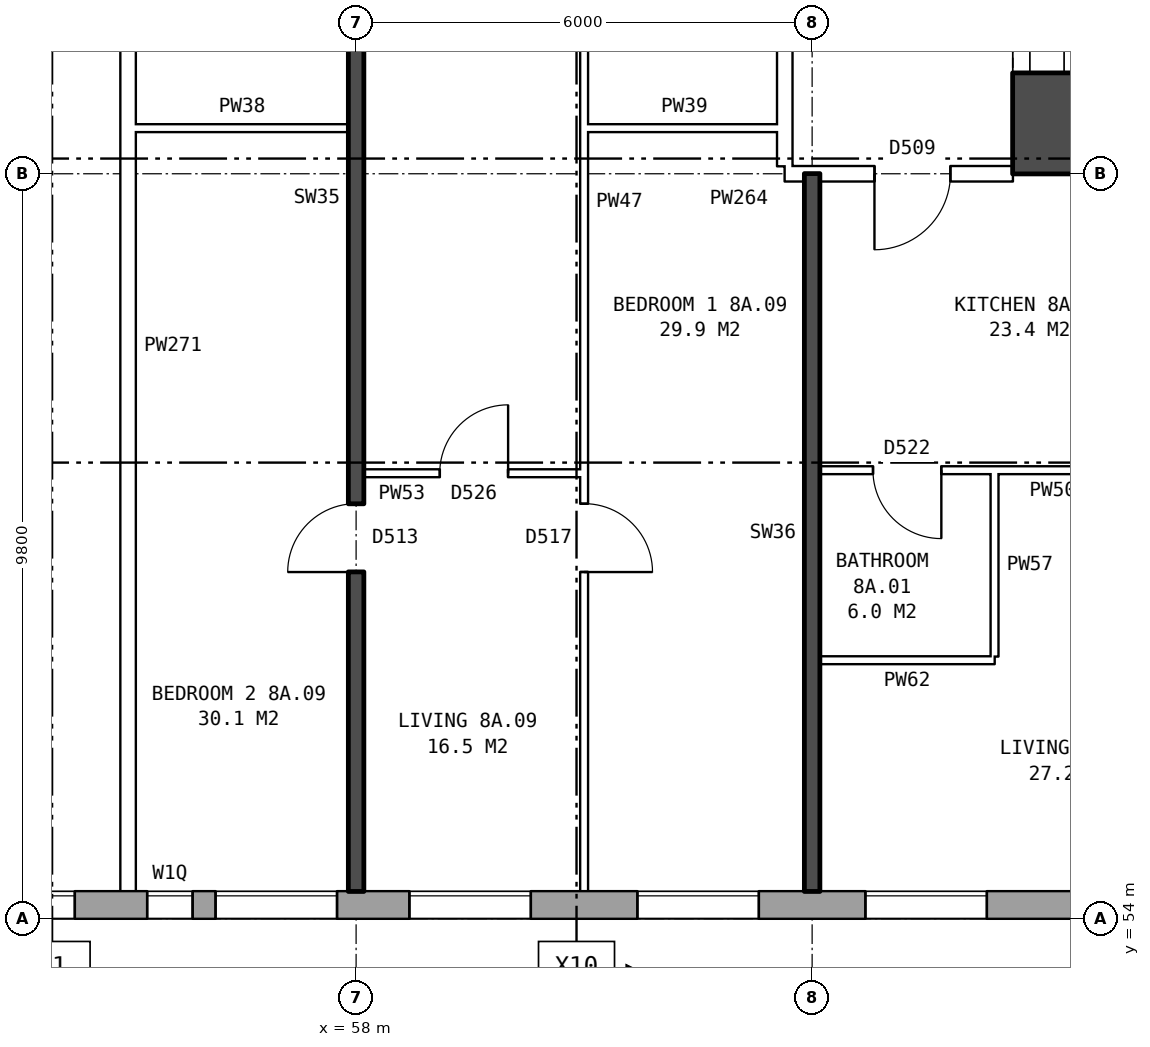
"""IFC4 building model, lengths in metres.
Left out: names, types, materials, properties, quantities, classifications, styles, units other than length and angle.
Written with IfcOpenShell. Run it as: python <this file> out.ifc"""

import sys

from ifc_helpers import new_model, si_unit, direction, frame, frame_2d, origin, place, context, subcontext, project, spatial, rectangle, extrude, element, fill, save


model = new_model("IFC4")
c1 = context("Model", 3, precision=1e-05, world=origin(), true_north=direction((0.0, 1.0)))
c2 = subcontext(c1, "Body", "Model", "MODEL_VIEW")
j1 = project(units=[si_unit("LENGTHUNIT", "METRE"), si_unit("PLANEANGLEUNIT", "RADIAN")], contexts=[c1])
p1 = place(None, origin())
s1 = spatial("IfcSite", under=j1, at=p1, CompositionType="ELEMENT")
p2 = place(p1, origin())
s2 = spatial("IfcBuilding", under=s1, at=p2, CompositionType="ELEMENT")
p3 = place(p2, frame((0.0, 0.0, 31.9)))
s3 = spatial("IfcBuildingStorey", under=s2, at=p3, CompositionType="ELEMENT", Elevation=31.9)
p4 = place(p3, frame((22.825, 54.18, 0.0), z_axis=(0.0, 0.0, 1.0), x_axis=(1.0, 0.0, 0.0)))
e1 = element("IfcWall", 1, at=p4, inside=s3, PredefinedType="STANDARD", context=c2, shape_type="SweptSolid", body=[
    extrude(rectangle(XDim=50.101, YDim=0.36, at=frame_2d((25.05, 0.0))), origin(), (0.0, 0.0, 1.0), 2.85),
])
p5 = place(p4, frame((2.875, 0.0, 0.8)))
e2 = element("IfcOpeningElement", 2, at=p5, cuts=e1, PredefinedType="OPENING", context=c2, shape_type="SweptSolid", body=[
    extrude(rectangle(XDim=1.6, YDim=1.8, at=frame_2d((0.8, 0.9))), frame((0.0, 0.19, 0.0), z_axis=(0.0, -1.0, 0.0), x_axis=(1.0, 0.0, 0.0)), (0.0, 0.0, 1.0), 0.38),
])
p6 = place(p4, frame((5.875, 0.0, 0.8)))
e3 = element("IfcOpeningElement", 3, at=p6, cuts=e1, PredefinedType="OPENING", context=c2, shape_type="SweptSolid", body=[
    extrude(rectangle(XDim=1.6, YDim=1.8, at=frame_2d((0.8, 0.9))), frame((0.0, 0.19, 0.0), z_axis=(0.0, -1.0, 0.0), x_axis=(1.0, 0.0, 0.0)), (0.0, 0.0, 1.0), 0.38),
])
p7 = place(p4, frame((8.875, 0.0, 0.8)))
e4 = element("IfcOpeningElement", 4, at=p7, cuts=e1, PredefinedType="OPENING", context=c2, shape_type="SweptSolid", body=[
    extrude(rectangle(XDim=1.6, YDim=1.8, at=frame_2d((0.8, 0.9))), frame((0.0, 0.19, 0.0), z_axis=(0.0, -1.0, 0.0), x_axis=(1.0, 0.0, 0.0)), (0.0, 0.0, 1.0), 0.38),
])
p8 = place(p4, frame((11.875, 0.0, 0.8)))
e5 = element("IfcOpeningElement", 5, at=p8, cuts=e1, PredefinedType="OPENING", context=c2, shape_type="SweptSolid", body=[
    extrude(rectangle(XDim=1.6, YDim=1.8, at=frame_2d((0.8, 0.9))), frame((0.0, 0.19, 0.0), z_axis=(0.0, -1.0, 0.0), x_axis=(1.0, 0.0, 0.0)), (0.0, 0.0, 1.0), 0.38),
])
p9 = place(p4, frame((14.875, 0.0, 0.8)))
e6 = element("IfcOpeningElement", 6, at=p9, cuts=e1, PredefinedType="OPENING", context=c2, shape_type="SweptSolid", body=[
    extrude(rectangle(XDim=1.6, YDim=1.8, at=frame_2d((0.8, 0.9))), frame((0.0, 0.19, 0.0), z_axis=(0.0, -1.0, 0.0), x_axis=(1.0, 0.0, 0.0)), (0.0, 0.0, 1.0), 0.38),
])
p10 = place(p4, frame((17.375, 0.0, 1.6)))
e7 = element("IfcOpeningElement", 7, at=p10, cuts=e1, PredefinedType="OPENING", context=c2, shape_type="SweptSolid", body=[
    extrude(rectangle(XDim=0.6, YDim=0.9, at=frame_2d((0.3, 0.45))), frame((0.0, 0.19, 0.0), z_axis=(0.0, -1.0, 0.0), x_axis=(1.0, 0.0, 0.0)), (0.0, 0.0, 1.0), 0.38),
])
p11 = place(p4, frame((20.875, 0.0, 0.8)))
e8 = element("IfcOpeningElement", 8, at=p11, cuts=e1, PredefinedType="OPENING", context=c2, shape_type="SweptSolid", body=[
    extrude(rectangle(XDim=1.6, YDim=1.8, at=frame_2d((0.8, 0.9))), frame((0.0, 0.19, 0.0), z_axis=(0.0, -1.0, 0.0), x_axis=(1.0, 0.0, 0.0)), (0.0, 0.0, 1.0), 0.38),
])
p12 = place(p4, frame((23.875, 0.0, 0.8)))
e9 = element("IfcOpeningElement", 9, at=p12, cuts=e1, PredefinedType="OPENING", context=c2, shape_type="SweptSolid", body=[
    extrude(rectangle(XDim=1.6, YDim=1.8, at=frame_2d((0.8, 0.9))), frame((0.0, 0.19, 0.0), z_axis=(0.0, -1.0, 0.0), x_axis=(1.0, 0.0, 0.0)), (0.0, 0.0, 1.0), 0.38),
])
p13 = place(p4, frame((26.875, 0.0, 0.8)))
e10 = element("IfcOpeningElement", 10, at=p13, cuts=e1, PredefinedType="OPENING", context=c2, shape_type="SweptSolid", body=[
    extrude(rectangle(XDim=1.6, YDim=1.8, at=frame_2d((0.8, 0.9))), frame((0.0, 0.19, 0.0), z_axis=(0.0, -1.0, 0.0), x_axis=(1.0, 0.0, 0.0)), (0.0, 0.0, 1.0), 0.38),
])
p14 = place(p4, frame((29.375, 0.0, 0.15)))
e11 = element("IfcOpeningElement", 11, at=p14, cuts=e1, PredefinedType="OPENING", context=c2, shape_type="SweptSolid", body=[
    extrude(rectangle(XDim=0.8, YDim=1.8, at=frame_2d((0.4, 0.9))), frame((0.0, 0.19, 0.0), z_axis=(0.0, -1.0, 0.0), x_axis=(1.0, 0.0, 0.0)), (0.0, 0.0, 1.0), 0.38),
])
p15 = place(p4, frame((32.425, 0.0, 1.4)))
e12 = element("IfcOpeningElement", 12, at=p15, cuts=e1, PredefinedType="OPENING", context=c2, shape_type="SweptSolid", body=[
    extrude(rectangle(XDim=0.6, YDim=1.2, at=frame_2d((0.3, 0.6))), frame((0.0, 0.19, 0.0), z_axis=(0.0, -1.0, 0.0), x_axis=(1.0, 0.0, 0.0)), (0.0, 0.0, 1.0), 0.38),
])
p16 = place(p4, frame((35.875, 0.0, 0.8)))
e13 = element("IfcOpeningElement", 13, at=p16, cuts=e1, PredefinedType="OPENING", context=c2, shape_type="SweptSolid", body=[
    extrude(rectangle(XDim=1.6, YDim=1.8, at=frame_2d((0.8, 0.9))), frame((0.0, 0.19, 0.0), z_axis=(0.0, -1.0, 0.0), x_axis=(1.0, 0.0, 0.0)), (0.0, 0.0, 1.0), 0.38),
])
p17 = place(p4, frame((38.875, 0.0, 0.8)))
e14 = element("IfcOpeningElement", 14, at=p17, cuts=e1, PredefinedType="OPENING", context=c2, shape_type="SweptSolid", body=[
    extrude(rectangle(XDim=1.6, YDim=1.8, at=frame_2d((0.8, 0.9))), frame((0.0, 0.19, 0.0), z_axis=(0.0, -1.0, 0.0), x_axis=(1.0, 0.0, 0.0)), (0.0, 0.0, 1.0), 0.38),
])
p18 = place(p4, frame((41.875, 0.0, 0.8)))
e15 = element("IfcOpeningElement", 15, at=p18, cuts=e1, PredefinedType="OPENING", context=c2, shape_type="SweptSolid", body=[
    extrude(rectangle(XDim=1.6, YDim=1.8, at=frame_2d((0.8, 0.9))), frame((0.0, 0.19, 0.0), z_axis=(0.0, -1.0, 0.0), x_axis=(1.0, 0.0, 0.0)), (0.0, 0.0, 1.0), 0.38),
])
p19 = place(p4, frame((44.875, 0.0, 0.8)))
e16 = element("IfcOpeningElement", 16, at=p19, cuts=e1, PredefinedType="OPENING", context=c2, shape_type="SweptSolid", body=[
    extrude(rectangle(XDim=1.6, YDim=1.8, at=frame_2d((0.8, 0.9))), frame((0.0, 0.19, 0.0), z_axis=(0.0, -1.0, 0.0), x_axis=(1.0, 0.0, 0.0)), (0.0, 0.0, 1.0), 0.38),
])
p20 = place(p4, frame((47.875, 0.0, 0.8)))
e17 = element("IfcOpeningElement", 17, at=p20, cuts=e1, PredefinedType="OPENING", context=c2, shape_type="SweptSolid", body=[
    extrude(rectangle(XDim=1.6, YDim=1.8, at=frame_2d((0.8, 0.9))), frame((0.0, 0.19, 0.0), z_axis=(0.0, -1.0, 0.0), x_axis=(1.0, 0.0, 0.0)), (0.0, 0.0, 1.0), 0.38),
])
p21 = place(p4, frame((19.525, 0.0, 0.8)))
e18 = element("IfcOpeningElement", 18, at=p21, cuts=e1, PredefinedType="OPENING", context=c2, shape_type="SweptSolid", body=[
    extrude(rectangle(XDim=1.0, YDim=0.9, at=frame_2d((0.5, 0.45))), frame((0.0, 0.19, 0.0), z_axis=(0.0, -1.0, 0.0), x_axis=(1.0, 0.0, 0.0)), (0.0, 0.0, 1.0), 0.38),
])
p22 = place(p4, frame((30.475, 0.0, 0.15)))
e19 = element("IfcOpeningElement", 19, at=p22, cuts=e1, PredefinedType="OPENING", context=c2, shape_type="SweptSolid", body=[
    extrude(rectangle(XDim=1.0, YDim=0.9, at=frame_2d((0.5, 0.45))), frame((0.0, 0.19, 0.0), z_axis=(0.0, -1.0, 0.0), x_axis=(1.0, 0.0, 0.0)), (0.0, 0.0, 1.0), 0.38),
])
p23 = place(p4, frame((33.325, 0.0, 0.8)))
e20 = element("IfcOpeningElement", 20, at=p23, cuts=e1, PredefinedType="OPENING", context=c2, shape_type="SweptSolid", body=[
    extrude(rectangle(XDim=1.6, YDim=1.8, at=frame_2d((0.8, 0.9))), frame((0.0, 0.19, 0.0), z_axis=(0.0, -1.0, 0.0), x_axis=(1.0, 0.0, 0.0)), (0.0, 0.0, 1.0), 0.38),
])
p24 = place(p3, frame((67.09, 64.7, 0.0), z_axis=(0.0, 0.0, 1.0), x_axis=(0.0, 1.0, 0.0)))
e21 = element("IfcWall", 21, at=p24, inside=s3, PredefinedType="SHEAR", context=c2, shape_type="SweptSolid", body=[
    extrude(rectangle(XDim=10.6, YDim=0.9, at=frame_2d((5.3, 0.0))), origin(), (0.0, 0.0, 1.0), 2.85),
])
p25 = place(p24, frame((0.425, 0.0, 0.0)))
e22 = element("IfcOpeningElement", 22, at=p25, cuts=e21, PredefinedType="OPENING", context=c2, shape_type="SweptSolid", body=[
    extrude(rectangle(XDim=1.1, YDim=2.1, at=frame_2d((0.55, 1.05))), frame((0.0, 0.46, 0.0), z_axis=(0.0, -1.0, 0.0), x_axis=(1.0, 0.0, 0.0)), (0.0, 0.0, 1.0), 0.92),
])
p26 = place(p24, frame((9.0, 0.0, 0.0)))
e23 = element("IfcOpeningElement", 23, at=p26, cuts=e21, PredefinedType="OPENING", context=c2, shape_type="SweptSolid", body=[
    extrude(rectangle(XDim=1.1, YDim=2.1, at=frame_2d((0.55, 1.05))), frame((0.0, 0.46, 0.0), z_axis=(0.0, -1.0, 0.0), x_axis=(1.0, 0.0, 0.0)), (0.0, 0.0, 1.0), 0.92),
])
p27 = place(p3, frame((66.64, 64.25, 0.0), z_axis=(0.0, 0.0, 1.0), x_axis=(1.0, 0.0, 0.0)))
e24 = element("IfcWall", 24, at=p27, inside=s3, PredefinedType="SHEAR", context=c2, shape_type="SweptSolid", body=[
    extrude(rectangle(XDim=9.0, YDim=0.9, at=frame_2d((4.5, 0.0))), origin(), (0.0, 0.0, 1.0), 2.85),
])
p28 = place(p3, frame((63.64, 63.9, 0.0), z_axis=(0.0, 0.0, 1.0), x_axis=(0.0, 1.0, 0.0)))
e25 = element("IfcWall", 25, at=p28, inside=s3, PredefinedType="PARTITIONING", context=c2, shape_type="SweptSolid", body=[
    extrude(rectangle(XDim=12.2, YDim=0.2, at=frame_2d((6.1, 0.0))), origin(), (0.0, 0.0, 1.0), 2.85),
])
p29 = place(p28, frame((5.1, 0.0, 0.0)))
e26 = element("IfcOpeningElement", 26, at=p29, cuts=e25, PredefinedType="OPENING", context=c2, shape_type="SweptSolid", body=[
    extrude(rectangle(XDim=2.0, YDim=2.1, at=frame_2d((1.0, 1.05))), frame((0.0, 0.11, 0.0), z_axis=(0.0, -1.0, 0.0), x_axis=(1.0, 0.0, 0.0)), (0.0, 0.0, 1.0), 0.22),
])
p30 = place(p3, frame((64.1, 57.4, 0.0), z_axis=(0.0, 0.0, 1.0), x_axis=(1.0, 0.0, 0.0)))
e27 = element("IfcWall", 27, at=p30, inside=s3, PredefinedType="PARTITIONING", context=c2, shape_type="SweptSolid", body=[
    extrude(rectangle(XDim=2.3, YDim=0.1, at=frame_2d((1.15, 0.0))), origin(), (0.0, 0.0, 1.0), 2.85),
])
p31 = place(p3, frame((58.1, 59.86, 0.0), z_axis=(0.0, 0.0, 1.0), x_axis=(1.0, 0.0, 0.0)))
e28 = element("IfcWall", 28, at=p31, inside=s3, PredefinedType="PARTITIONING", context=c2, shape_type="SweptSolid", body=[
    extrude(rectangle(XDim=2.9, YDim=0.1, at=frame_2d((1.45, 0.0))), origin(), (0.0, 0.0, 1.0), 2.85),
])
p32 = place(p31, frame((1.0, 0.0, 0.0)))
e29 = element("IfcOpeningElement", 29, at=p32, cuts=e28, PredefinedType="OPENING", context=c2, shape_type="SweptSolid", body=[
    extrude(rectangle(XDim=0.9, YDim=2.1, at=frame_2d((0.45, 1.05))), frame((0.0, 0.06, 0.0), z_axis=(0.0, -1.0, 0.0), x_axis=(1.0, 0.0, 0.0)), (0.0, 0.0, 1.0), 0.12),
])
p33 = place(p3, frame((64.1, 59.9, 0.0), z_axis=(0.0, 0.0, 1.0), x_axis=(1.0, 0.0, 0.0)))
e30 = element("IfcWall", 30, at=p33, inside=s3, PredefinedType="PARTITIONING", context=c2, shape_type="SweptSolid", body=[
    extrude(rectangle(XDim=5.8, YDim=0.1, at=frame_2d((2.9, 0.0))), origin(), (0.0, 0.0, 1.0), 2.85),
])
p34 = place(p33, frame((3.6, 0.0, 0.0)))
e31 = element("IfcOpeningElement", 31, at=p34, cuts=e30, PredefinedType="OPENING", context=c2, shape_type="SweptSolid", body=[
    extrude(rectangle(XDim=0.9, YDim=2.1, at=frame_2d((0.45, 1.05))), frame((0.0, 0.06, 0.0), z_axis=(0.0, -1.0, 0.0), x_axis=(1.0, 0.0, 0.0)), (0.0, 0.0, 1.0), 0.12),
])
p35 = place(p33, frame((0.7, 0.0, 0.0)))
e32 = element("IfcOpeningElement", 32, at=p35, cuts=e30, PredefinedType="OPENING", context=c2, shape_type="SweptSolid", body=[
    extrude(rectangle(XDim=0.9, YDim=2.1, at=frame_2d((0.45, 1.05))), frame((0.0, 0.06, 0.0), z_axis=(0.0, -1.0, 0.0), x_axis=(1.0, 0.0, 0.0)), (0.0, 0.0, 1.0), 0.12),
])
p36 = place(p3, frame((63.64, 63.8, 0.0), z_axis=(0.0, 0.0, 1.0), x_axis=(1.0, 0.0, 0.0)))
e33 = element("IfcWall", 33, at=p36, inside=s3, PredefinedType="PARTITIONING", context=c2, shape_type="SweptSolid", body=[
    extrude(rectangle(XDim=3.0, YDim=0.2, at=frame_2d((1.5, 0.0))), origin(), (0.0, 0.0, 1.0), 2.85),
])
p37 = place(p36, frame((1.18, 0.0, 0.0)))
e34 = element("IfcOpeningElement", 34, at=p37, cuts=e33, PredefinedType="OPENING", context=c2, shape_type="SweptSolid", body=[
    extrude(rectangle(XDim=1.0, YDim=2.1, at=frame_2d((0.5, 1.05))), frame((0.0, 0.11, 0.0), z_axis=(0.0, -1.0, 0.0), x_axis=(1.0, 0.0, 0.0)), (0.0, 0.0, 1.0), 0.22),
])
p38 = place(p3, frame((55.1, 64.4, 0.0), z_axis=(0.0, 0.0, 1.0), x_axis=(1.0, 0.0, 0.0)))
e35 = element("IfcWall", 35, at=p38, inside=s3, PredefinedType="PARTITIONING", context=c2, shape_type="SweptSolid", body=[
    extrude(rectangle(XDim=2.8, YDim=0.1, at=frame_2d((1.4, 0.0))), origin(), (0.0, 0.0, 1.0), 2.85),
])
p39 = place(p3, frame((61.0, 64.4, 0.0), z_axis=(0.0, 0.0, 1.0), x_axis=(1.0, 0.0, 0.0)))
e36 = element("IfcWall", 36, at=p39, inside=s3, PredefinedType="PARTITIONING", context=c2, shape_type="SweptSolid", body=[
    extrude(rectangle(XDim=2.64, YDim=0.1, at=frame_2d((1.32, 0.0))), origin(), (0.0, 0.0, 1.0), 2.85),
])
p40 = place(p3, frame((55.0, 54.36, 0.0), z_axis=(0.0, 0.0, 1.0), x_axis=(0.0, 1.0, 0.0)))
e37 = element("IfcWall", 37, at=p40, inside=s3, PredefinedType="PARTITIONING", context=c2, shape_type="SweptSolid", body=[
    extrude(rectangle(XDim=14.34, YDim=0.2, at=frame_2d((7.17, 0.0))), origin(), (0.0, 0.0, 1.0), 2.85),
])
p41 = place(p3, frame((58.0, 54.36, 0.0), z_axis=(0.0, 0.0, 1.0), x_axis=(0.0, 1.0, 0.0)))
e38 = element("IfcWall", 38, at=p41, inside=s3, PredefinedType="SOLIDWALL", context=c2, shape_type="SweptSolid", body=[
    extrude(rectangle(XDim=14.44, YDim=0.2, at=frame_2d((7.22, 0.0))), origin(), (0.0, 0.0, 1.0), 2.85),
])
p42 = place(p41, frame((4.2, 0.0, 0.0)))
e39 = element("IfcOpeningElement", 39, at=p42, cuts=e38, PredefinedType="OPENING", context=c2, shape_type="SweptSolid", body=[
    extrude(rectangle(XDim=0.9, YDim=2.1, at=frame_2d((0.45, 1.05))), frame((0.0, 0.11, 0.0), z_axis=(0.0, -1.0, 0.0), x_axis=(1.0, 0.0, 0.0)), (0.0, 0.0, 1.0), 0.22),
])
p43 = place(p41, frame((13.14, 0.0, 0.0)))
e40 = element("IfcOpeningElement", 40, at=p43, cuts=e38, PredefinedType="OPENING", context=c2, shape_type="SweptSolid", body=[
    extrude(rectangle(XDim=0.9, YDim=2.1, at=frame_2d((0.45, 1.05))), frame((0.0, 0.11, 0.0), z_axis=(0.0, -1.0, 0.0), x_axis=(1.0, 0.0, 0.0)), (0.0, 0.0, 1.0), 0.22),
])
p44 = place(p3, frame((61.0, 54.36, 0.0), z_axis=(0.0, 0.0, 1.0), x_axis=(0.0, 1.0, 0.0)))
e41 = element("IfcWall", 41, at=p44, inside=s3, PredefinedType="PARTITIONING", context=c2, shape_type="SweptSolid", body=[
    extrude(rectangle(XDim=14.34, YDim=0.1, at=frame_2d((7.17, 0.0))), origin(), (0.0, 0.0, 1.0), 2.85),
])
p45 = place(p44, frame((4.2, 0.0, 0.0)))
e42 = element("IfcOpeningElement", 42, at=p45, cuts=e41, PredefinedType="OPENING", context=c2, shape_type="SweptSolid", body=[
    extrude(rectangle(XDim=0.9, YDim=2.1, at=frame_2d((0.45, 1.05))), frame((0.0, 0.06, 0.0), z_axis=(0.0, -1.0, 0.0), x_axis=(1.0, 0.0, 0.0)), (0.0, 0.0, 1.0), 0.12),
])
p46 = place(p44, frame((13.04, 0.0, 0.0)))
e43 = element("IfcOpeningElement", 43, at=p46, cuts=e41, PredefinedType="OPENING", context=c2, shape_type="SweptSolid", body=[
    extrude(rectangle(XDim=0.9, YDim=2.1, at=frame_2d((0.45, 1.05))), frame((0.0, 0.06, 0.0), z_axis=(0.0, -1.0, 0.0), x_axis=(1.0, 0.0, 0.0)), (0.0, 0.0, 1.0), 0.12),
])
p47 = place(p3, frame((64.0, 54.36, 0.0), z_axis=(0.0, 0.0, 1.0), x_axis=(0.0, 1.0, 0.0)))
e44 = element("IfcWall", 44, at=p47, inside=s3, PredefinedType="SOLIDWALL", context=c2, shape_type="SweptSolid", body=[
    extrude(rectangle(XDim=9.44, YDim=0.2, at=frame_2d((4.72, 0.0))), origin(), (0.0, 0.0, 1.0), 2.85),
])
p48 = place(p3, frame((66.4, 57.45, 0.0), z_axis=(0.0, 0.0, 1.0), x_axis=(0.0, 1.0, 0.0)))
e45 = element("IfcWall", 45, at=p48, inside=s3, PredefinedType="PARTITIONING", context=c2, shape_type="SweptSolid", body=[
    extrude(rectangle(XDim=2.4, YDim=0.1, at=frame_2d((1.2, 0.0))), origin(), (0.0, 0.0, 1.0), 2.85),
])
p49 = place(p15, origin())
e46 = element("IfcWindow", 46, at=p49, inside=s3, PartitioningType="SINGLE_PANEL", PredefinedType="WINDOW", context=c2, shape_type="SweptSolid", body=[
    extrude(rectangle(XDim=0.6, YDim=1.2, at=frame_2d((0.3, 0.6))), frame((0.0, 0.15, 0.0), z_axis=(0.0, -1.0, 0.0), x_axis=(1.0, 0.0, 0.0)), (0.0, 0.0, 1.0), 0.06),
])
fill(e12, e46)
p50 = place(p16, origin())
e47 = element("IfcWindow", 47, at=p50, inside=s3, PartitioningType="SINGLE_PANEL", PredefinedType="WINDOW", context=c2, shape_type="SweptSolid", body=[
    extrude(rectangle(XDim=1.6, YDim=1.8, at=frame_2d((0.8, 0.9))), frame((0.0, 0.15, 0.0), z_axis=(0.0, -1.0, 0.0), x_axis=(1.0, 0.0, 0.0)), (0.0, 0.0, 1.0), 0.06),
])
fill(e13, e47)
p51 = place(p17, origin())
e48 = element("IfcWindow", 48, at=p51, inside=s3, PartitioningType="SINGLE_PANEL", PredefinedType="WINDOW", context=c2, shape_type="SweptSolid", body=[
    extrude(rectangle(XDim=1.6, YDim=1.8, at=frame_2d((0.8, 0.9))), frame((0.0, 0.15, 0.0), z_axis=(0.0, -1.0, 0.0), x_axis=(1.0, 0.0, 0.0)), (0.0, 0.0, 1.0), 0.06),
])
fill(e14, e48)
p52 = place(p18, origin())
e49 = element("IfcWindow", 49, at=p52, inside=s3, PartitioningType="SINGLE_PANEL", PredefinedType="WINDOW", context=c2, shape_type="SweptSolid", body=[
    extrude(rectangle(XDim=1.6, YDim=1.8, at=frame_2d((0.8, 0.9))), frame((0.0, 0.15, 0.0), z_axis=(0.0, -1.0, 0.0), x_axis=(1.0, 0.0, 0.0)), (0.0, 0.0, 1.0), 0.06),
])
fill(e15, e49)
p53 = place(p37, frame((1.0, 0.0, 0.0), z_axis=(0.0, 0.0, 1.0), x_axis=(-1.0, 0.0, 0.0)))
e50 = element("IfcDoor", 50, at=p53, inside=s3, OperationType="SINGLE_SWING_RIGHT", PredefinedType="DOOR", context=c2, shape_type="SweptSolid", body=[
    extrude(rectangle(XDim=1.0, YDim=2.1, at=frame_2d((0.5, 1.05))), frame((0.0, 0.025, 0.0), z_axis=(0.0, -1.0, 0.0), x_axis=(1.0, 0.0, 0.0)), (0.0, 0.0, 1.0), 0.05),
])
fill(e34, e50)
p54 = place(p35, frame((0.9, 0.0, 0.0), z_axis=(0.0, 0.0, 1.0), x_axis=(-1.0, 0.0, 0.0)))
e51 = element("IfcDoor", 51, at=p54, inside=s3, OperationType="SINGLE_SWING_LEFT", PredefinedType="DOOR", context=c2, shape_type="SweptSolid", body=[
    extrude(rectangle(XDim=0.9, YDim=2.1, at=frame_2d((0.45, 1.05))), frame((0.0, 0.025, 0.0), z_axis=(0.0, -1.0, 0.0), x_axis=(1.0, 0.0, 0.0)), (0.0, 0.0, 1.0), 0.05),
])
fill(e32, e51)
p55 = place(p45, frame((0.9, 0.0, 0.0), z_axis=(0.0, 0.0, 1.0), x_axis=(-1.0, 0.0, 0.0)))
e52 = element("IfcDoor", 52, at=p55, inside=s3, OperationType="SINGLE_SWING_RIGHT", PredefinedType="DOOR", context=c2, shape_type="SweptSolid", body=[
    extrude(rectangle(XDim=0.9, YDim=2.1, at=frame_2d((0.45, 1.05))), frame((0.0, 0.025, 0.0), z_axis=(0.0, -1.0, 0.0), x_axis=(1.0, 0.0, 0.0)), (0.0, 0.0, 1.0), 0.05),
])
fill(e42, e52)
p56 = place(p42, origin())
e53 = element("IfcDoor", 53, at=p56, inside=s3, OperationType="SINGLE_SWING_LEFT", PredefinedType="DOOR", context=c2, shape_type="SweptSolid", body=[
    extrude(rectangle(XDim=0.9, YDim=2.1, at=frame_2d((0.45, 1.05))), frame((0.0, 0.025, 0.0), z_axis=(0.0, -1.0, 0.0), x_axis=(1.0, 0.0, 0.0)), (0.0, 0.0, 1.0), 0.05),
])
fill(e39, e53)
p57 = place(p32, origin())
e54 = element("IfcDoor", 54, at=p57, inside=s3, OperationType="SINGLE_SWING_RIGHT", PredefinedType="DOOR", context=c2, shape_type="SweptSolid", body=[
    extrude(rectangle(XDim=0.9, YDim=2.1, at=frame_2d((0.45, 1.05))), frame((0.0, 0.025, 0.0), z_axis=(0.0, -1.0, 0.0), x_axis=(1.0, 0.0, 0.0)), (0.0, 0.0, 1.0), 0.05),
])
fill(e29, e54)
p58 = place(p22, origin())
e55 = element("IfcWindow", 55, at=p58, inside=s3, PartitioningType="SINGLE_PANEL", PredefinedType="WINDOW", context=c2, shape_type="SweptSolid", body=[
    extrude(rectangle(XDim=1.0, YDim=0.9, at=frame_2d((0.5, 0.45))), frame((0.0, 0.15, 0.0), z_axis=(0.0, -1.0, 0.0), x_axis=(1.0, 0.0, 0.0)), (0.0, 0.0, 1.0), 0.06),
])
fill(e19, e55)
p59 = place(p23, origin())
e56 = element("IfcWindow", 56, at=p59, inside=s3, PartitioningType="SINGLE_PANEL", PredefinedType="WINDOW", context=c2, shape_type="SweptSolid", body=[
    extrude(rectangle(XDim=1.6, YDim=1.8, at=frame_2d((0.8, 0.9))), frame((0.0, 0.15, 0.0), z_axis=(0.0, -1.0, 0.0), x_axis=(1.0, 0.0, 0.0)), (0.0, 0.0, 1.0), 0.06),
])
fill(e20, e56)
save(model, sys.argv[1])
